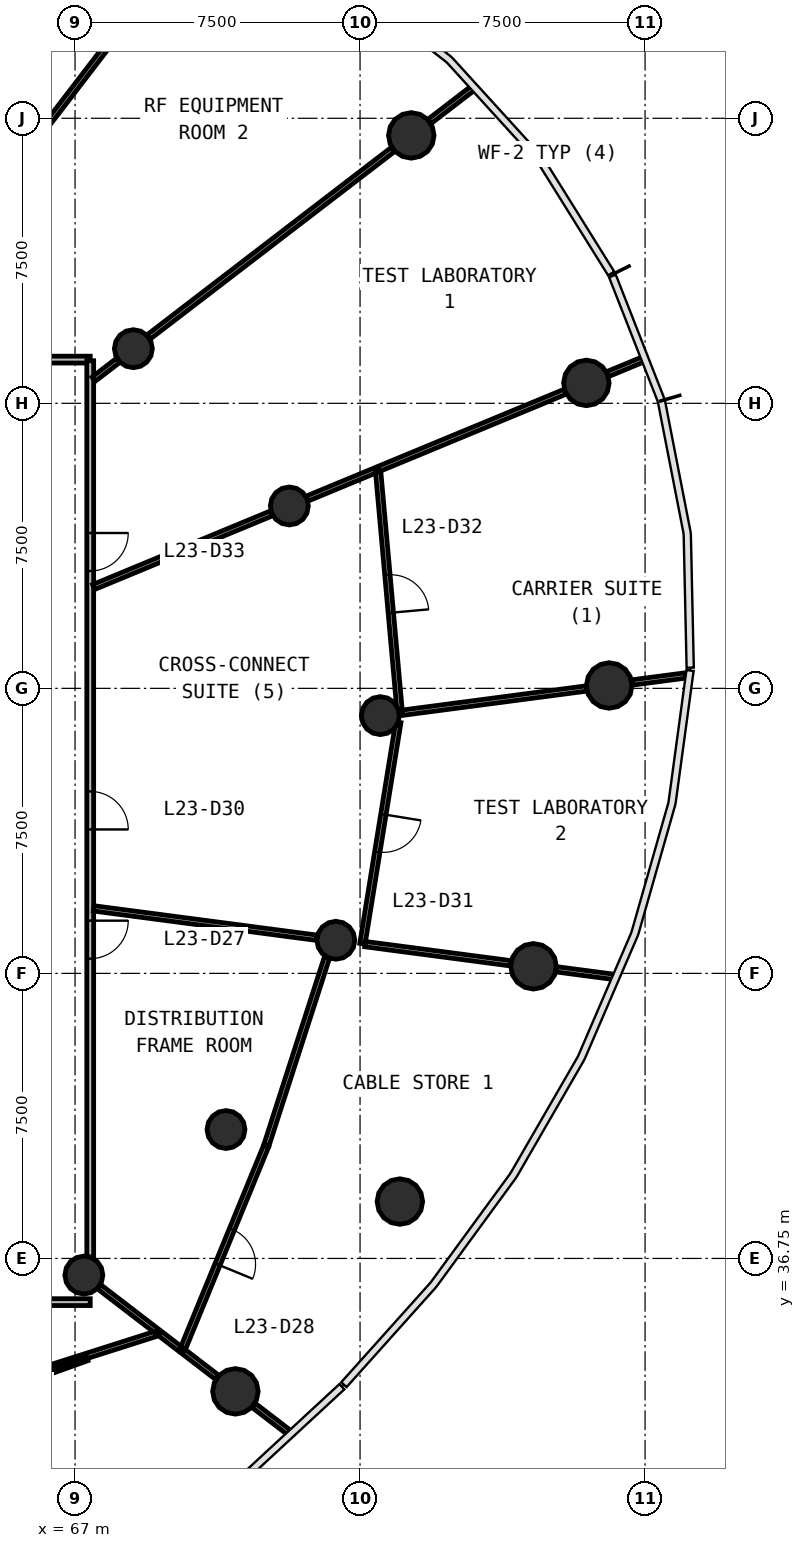
"""IFC4 building model, lengths in metres.
Left out: names, types, materials, properties, quantities, classifications, styles, units other than length and angle.
Written with IfcOpenShell. Run it as: python <this file> out.ifc"""

import sys

from ifc_helpers import new_model, si_unit, direction, frame, frame_2d, origin, origin_2d, place, context, subcontext, project, spatial, rectangle, circle, extrude, source, transform, mapped, element, fill, save


model = new_model("IFC4")
c1 = context("Model", 3, precision=1e-05, world=origin(), true_north=direction((0.0, 1.0)))
c2 = subcontext(c1, "Body", "Model", "MODEL_VIEW")
j1 = project(units=[si_unit("LENGTHUNIT", "METRE"), si_unit("PLANEANGLEUNIT", "RADIAN")], contexts=[c1])
p1 = place(None, origin())
s1 = spatial("IfcSite", under=j1, at=p1, CompositionType="ELEMENT")
p2 = place(p1, origin())
s2 = spatial("IfcBuilding", under=s1, at=p2, CompositionType="ELEMENT")
p3 = place(p2, frame((0.0, 0.0, 100.3)))
s3 = spatial("IfcBuildingStorey", under=s2, at=p3, CompositionType="ELEMENT", Elevation=100.3)
m1 = source(origin(), c2, "Body", "SweptSolid", [
    extrude(circle(Radius=0.6, at=origin_2d()), origin(), (0.0, 0.0, 1.0), 4.1),
])
for number, where, z_axis, x_axis in (
    (1, (81.056, 51.825, 0.0), (0.0, 0.0, 1.0), (1.0, 0.0, 0.0)),
    (2, (80.456, 59.787, 0.0), (0.0, 0.0, 1.0), (1.0, 0.0, 0.0)),
    (3, (75.848, 66.299, 0.0), (0.0, 0.0, 1.0), (1.0, 0.0, 0.0)),
    (4, (71.22, 33.252, 0.0), (0.0, 0.0, 1.0), (1.0, 0.0, 0.0)),
    (5, (75.548, 38.246, 0.0), (0.0, 0.0, 1.0), (1.0, 0.0, 0.0)),
    (6, (79.064, 44.437, 0.0), (0.0, 0.0, 1.0), (1.0, 0.0, 0.0)),
):
    element("IfcColumn", number, at=place(p3, frame(where, z_axis=z_axis, x_axis=x_axis)), inside=s3, PredefinedType="COLUMN", context=c2, shape_type="MappedRepresentation", body=[
        mapped(m1, transform((0.0, 0.0, 0.0), scale=1.0)),
    ])
m2 = source(origin(), c2, "Body", "SweptSolid", [
    extrude(circle(Radius=0.5, at=origin_2d()), origin(), (0.0, 0.0, 1.0), 4.1),
])
for number, where, z_axis, x_axis in (
    (7, (75.034, 51.032, 0.0), (0.0, 0.0, 1.0), (1.0, 0.0, 0.0)),
    (8, (72.639, 56.549, 0.0), (0.0, 0.0, 1.0), (1.0, 0.0, 0.0)),
    (9, (68.535, 60.688, 0.0), (0.0, 0.0, 1.0), (1.0, 0.0, 0.0)),
    (10, (67.232, 36.312, 0.0), (0.0, 0.0, 1.0), (1.0, 0.0, 0.0)),
    (11, (70.972, 40.141, 0.0), (0.0, 0.0, 1.0), (1.0, 0.0, 0.0)),
    (12, (73.863, 45.122, 0.0), (0.0, 0.0, 1.0), (1.0, 0.0, 0.0)),
):
    element("IfcColumn", number, at=place(p3, frame(where, z_axis=z_axis, x_axis=x_axis)), inside=s3, PredefinedType="COLUMN", context=c2, shape_type="MappedRepresentation", body=[
        mapped(m2, transform((0.0, 0.0, 0.0), scale=1.0)),
    ])
p4 = place(p3, frame((67.4, 35.6, 0.0), z_axis=(0.0, 0.0, 1.0), x_axis=(-1.0, 0.0, 0.0)))
e13 = element("IfcWall", 13, at=p4, inside=s3, PredefinedType="PARTITIONING", context=c2, shape_type="SweptSolid", body=[
    extrude(rectangle(XDim=30.8, YDim=0.18, at=frame_2d((15.4, 0.0))), origin(), (0.0, 0.0, 1.0), 2.9),
])
p5 = place(p4, frame((9.05, 0.0, 0.0)))
e14 = element("IfcOpeningElement", 14, at=p5, cuts=e13, PredefinedType="OPENING", context=c2, shape_type="SweptSolid", body=[
    extrude(rectangle(XDim=0.9, YDim=2.1, at=frame_2d((0.45, 1.05))), frame((0.0, 0.1, 0.0), z_axis=(0.0, -1.0, 0.0), x_axis=(1.0, 0.0, 0.0)), (0.0, 0.0, 1.0), 0.2),
])
p6 = place(p4, frame((6.05, 0.0, 0.0)))
e15 = element("IfcOpeningElement", 15, at=p6, cuts=e13, PredefinedType="OPENING", context=c2, shape_type="SweptSolid", body=[
    extrude(rectangle(XDim=0.9, YDim=2.1, at=frame_2d((0.45, 1.05))), frame((0.0, 0.1, 0.0), z_axis=(0.0, -1.0, 0.0), x_axis=(1.0, 0.0, 0.0)), (0.0, 0.0, 1.0), 0.2),
])
p7 = place(p4, frame((2.45, 0.0, 0.0)))
e16 = element("IfcOpeningElement", 16, at=p7, cuts=e13, PredefinedType="OPENING", context=c2, shape_type="SweptSolid", body=[
    extrude(rectangle(XDim=0.9, YDim=2.1, at=frame_2d((0.45, 1.05))), frame((0.0, 0.1, 0.0), z_axis=(0.0, -1.0, 0.0), x_axis=(1.0, 0.0, 0.0)), (0.0, 0.0, 1.0), 0.2),
])
p8 = place(p4, frame((20.95, 0.0, 0.0)))
e17 = element("IfcOpeningElement", 17, at=p8, cuts=e13, PredefinedType="OPENING", context=c2, shape_type="SweptSolid", body=[
    extrude(rectangle(XDim=1.0, YDim=2.1, at=frame_2d((0.5, 1.05))), frame((0.0, 0.1, 0.0), z_axis=(0.0, -1.0, 0.0), x_axis=(1.0, 0.0, 0.0)), (0.0, 0.0, 1.0), 0.2),
])
p9 = place(p4, frame((14.95, 0.0, 0.0)))
e18 = element("IfcOpeningElement", 18, at=p9, cuts=e13, PredefinedType="OPENING", context=c2, shape_type="SweptSolid", body=[
    extrude(rectangle(XDim=1.0, YDim=2.1, at=frame_2d((0.5, 1.05))), frame((0.0, 0.1, 0.0), z_axis=(0.0, -1.0, 0.0), x_axis=(1.0, 0.0, 0.0)), (0.0, 0.0, 1.0), 0.2),
])
p10 = place(p4, frame((12.55, 0.0, 0.0)))
e19 = element("IfcOpeningElement", 19, at=p10, cuts=e13, PredefinedType="OPENING", context=c2, shape_type="SweptSolid", body=[
    extrude(rectangle(XDim=1.0, YDim=2.1, at=frame_2d((0.5, 1.05))), frame((0.0, 0.1, 0.0), z_axis=(0.0, -1.0, 0.0), x_axis=(1.0, 0.0, 0.0)), (0.0, 0.0, 1.0), 0.2),
])
p11 = place(p3, frame((36.6, 60.4, 0.0), z_axis=(0.0, 0.0, 1.0), x_axis=(1.0, 0.0, 0.0)))
e20 = element("IfcWall", 20, at=p11, inside=s3, PredefinedType="PARTITIONING", context=c2, shape_type="SweptSolid", body=[
    extrude(rectangle(XDim=30.8, YDim=0.18, at=frame_2d((15.4, 0.0))), origin(), (0.0, 0.0, 1.0), 2.9),
])
p12 = place(p11, frame((25.55, 0.0, 0.0)))
e21 = element("IfcOpeningElement", 21, at=p12, cuts=e20, PredefinedType="OPENING", context=c2, shape_type="SweptSolid", body=[
    extrude(rectangle(XDim=1.0, YDim=2.1, at=frame_2d((0.5, 1.05))), frame((0.0, 0.1, 0.0), z_axis=(0.0, -1.0, 0.0), x_axis=(1.0, 0.0, 0.0)), (0.0, 0.0, 1.0), 0.2),
])
p13 = place(p11, frame((20.95, 0.0, 0.0)))
e22 = element("IfcOpeningElement", 22, at=p13, cuts=e20, PredefinedType="OPENING", context=c2, shape_type="SweptSolid", body=[
    extrude(rectangle(XDim=1.0, YDim=2.1, at=frame_2d((0.5, 1.05))), frame((0.0, 0.1, 0.0), z_axis=(0.0, -1.0, 0.0), x_axis=(1.0, 0.0, 0.0)), (0.0, 0.0, 1.0), 0.2),
])
p14 = place(p11, frame((14.95, 0.0, 0.0)))
e23 = element("IfcOpeningElement", 23, at=p14, cuts=e20, PredefinedType="OPENING", context=c2, shape_type="SweptSolid", body=[
    extrude(rectangle(XDim=1.0, YDim=2.1, at=frame_2d((0.5, 1.05))), frame((0.0, 0.1, 0.0), z_axis=(0.0, -1.0, 0.0), x_axis=(1.0, 0.0, 0.0)), (0.0, 0.0, 1.0), 0.2),
])
p15 = place(p11, frame((8.95, 0.0, 0.0)))
e24 = element("IfcOpeningElement", 24, at=p15, cuts=e20, PredefinedType="OPENING", context=c2, shape_type="SweptSolid", body=[
    extrude(rectangle(XDim=1.0, YDim=2.1, at=frame_2d((0.5, 1.05))), frame((0.0, 0.1, 0.0), z_axis=(0.0, -1.0, 0.0), x_axis=(1.0, 0.0, 0.0)), (0.0, 0.0, 1.0), 0.2),
])
p16 = place(p3, frame((67.4, 60.37, 0.0), z_axis=(0.0, 0.0, 1.0), x_axis=(0.0, -1.0, 0.0)))
e25 = element("IfcWall", 25, at=p16, inside=s3, PredefinedType="PARTITIONING", context=c2, shape_type="SweptSolid", body=[
    extrude(rectangle(XDim=23.583, YDim=0.18, at=frame_2d((11.791, 0.0))), origin(), (0.0, 0.0, 1.0), 2.9),
])
p17 = place(p16, frame((14.732, 0.0, 0.0)))
e26 = element("IfcOpeningElement", 26, at=p17, cuts=e25, PredefinedType="OPENING", context=c2, shape_type="SweptSolid", body=[
    extrude(rectangle(XDim=1.0, YDim=2.1, at=frame_2d((0.5, 1.05))), frame((0.0, 0.1, 0.0), z_axis=(0.0, -1.0, 0.0), x_axis=(1.0, 0.0, 0.0)), (0.0, 0.0, 1.0), 0.2),
])
p18 = place(p16, frame((11.333, 0.0, 0.0)))
e27 = element("IfcOpeningElement", 27, at=p18, cuts=e25, PredefinedType="OPENING", context=c2, shape_type="SweptSolid", body=[
    extrude(rectangle(XDim=1.0, YDim=2.1, at=frame_2d((0.5, 1.05))), frame((0.0, 0.1, 0.0), z_axis=(0.0, -1.0, 0.0), x_axis=(1.0, 0.0, 0.0)), (0.0, 0.0, 1.0), 0.2),
])
p19 = place(p16, frame((4.532, 0.0, 0.0)))
e28 = element("IfcOpeningElement", 28, at=p19, cuts=e25, PredefinedType="OPENING", context=c2, shape_type="SweptSolid", body=[
    extrude(rectangle(XDim=1.0, YDim=2.1, at=frame_2d((0.5, 1.05))), frame((0.0, 0.1, 0.0), z_axis=(0.0, -1.0, 0.0), x_axis=(1.0, 0.0, 0.0)), (0.0, 0.0, 1.0), 0.2),
])
p20 = place(p3, frame((68.935, 60.995, 0.0), z_axis=(0.0, 0.0, 1.0), x_axis=(0.793358692504, 0.608754453805, 0.0)))
e29 = element("IfcWall", 29, at=p20, inside=s3, PredefinedType="PARTITIONING", context=c2, shape_type="SweptSolid", body=[
    extrude(rectangle(XDim=8.11, YDim=0.14, at=frame_2d((4.055, 0.0))), origin(), (0.0, 0.0, 1.0), 2.9),
])
p21 = place(p3, frame((64.142, 63.824, 0.0), z_axis=(0.0, 0.0, 1.0), x_axis=(0.608755907151, 0.793357577331, 0.0)))
e30 = element("IfcWall", 30, at=p21, inside=s3, PredefinedType="PARTITIONING", context=c2, shape_type="SweptSolid", body=[
    extrude(rectangle(XDim=7.615, YDim=0.14, at=frame_2d((3.808, 0.0))), origin(), (0.0, 0.0, 1.0), 2.9),
])
p22 = place(p3, frame((74.97, 57.515, 0.0), z_axis=(0.0, 0.0, 1.0), x_axis=(0.089462467016, -0.995990194227, 0.0)))
e31 = element("IfcWall", 31, at=p22, inside=s3, PredefinedType="PARTITIONING", context=c2, shape_type="SweptSolid", body=[
    extrude(rectangle(XDim=6.44, YDim=0.14, at=frame_2d((3.22, 0.0))), origin(), (0.0, 0.0, 1.0), 2.9),
])
p23 = place(p22, frame((2.791, 0.0, 0.0)))
e32 = element("IfcOpeningElement", 32, at=p23, cuts=e31, PredefinedType="OPENING", context=c2, shape_type="SweptSolid", body=[
    extrude(rectangle(XDim=1.0, YDim=2.1, at=frame_2d((0.5, 1.05))), frame((0.0, 0.08, 0.0), z_axis=(0.0, -1.0, 0.0), x_axis=(1.0, 0.0, 0.0)), (0.0, 0.0, 1.0), 0.16),
])
p24 = place(p3, frame((67.49, 45.961, 0.0), z_axis=(0.0, 0.0, 1.0), x_axis=(0.991445034615, -0.130524876315, 0.0)))
e33 = element("IfcWall", 33, at=p24, inside=s3, PredefinedType="PARTITIONING", context=c2, shape_type="SweptSolid", body=[
    extrude(rectangle(XDim=5.924, YDim=0.14, at=frame_2d((2.962, 0.0))), origin(), (0.0, 0.0, 1.0), 2.9),
])
p25 = place(p3, frame((63.525, 32.98, 0.0), z_axis=(0.0, 0.0, 1.0), x_axis=(0.952796236259, 0.303610494172, 0.0)))
e34 = element("IfcWall", 34, at=p25, inside=s3, PredefinedType="PARTITIONING", context=c2, shape_type="SweptSolid", body=[
    extrude(rectangle(XDim=5.969, YDim=0.14, at=frame_2d((2.984, 0.0))), origin(), (0.0, 0.0, 1.0), 2.9),
])
p26 = place(p3, frame((75.507, 50.858, 0.0), z_axis=(0.0, 0.0, 1.0), x_axis=(-0.160052648202, -0.987108479248, 0.0)))
e35 = element("IfcWall", 35, at=p26, inside=s3, PredefinedType="PARTITIONING", context=c2, shape_type="SweptSolid", body=[
    extrude(rectangle(XDim=5.905, YDim=0.14, at=frame_2d((2.952, 0.0))), origin(), (0.0, 0.0, 1.0), 2.9),
])
p27 = place(p26, frame((2.455, 0.0, 0.0)))
e36 = element("IfcOpeningElement", 36, at=p27, cuts=e35, PredefinedType="OPENING", context=c2, shape_type="SweptSolid", body=[
    extrude(rectangle(XDim=1.0, YDim=2.1, at=frame_2d((0.5, 1.05))), frame((0.0, 0.08, 0.0), z_axis=(0.0, -1.0, 0.0), x_axis=(1.0, 0.0, 0.0)), (0.0, 0.0, 1.0), 0.16),
])
p28 = place(p3, frame((72.028, 39.704, 0.0), z_axis=(0.0, 0.0, 1.0), x_axis=(-0.380042060719, -0.92496920602, 0.0)))
e37 = element("IfcWall", 37, at=p28, inside=s3, PredefinedType="PARTITIONING", context=c2, shape_type="SweptSolid", body=[
    extrude(rectangle(XDim=5.813, YDim=0.14, at=frame_2d((2.907, 0.0))), origin(), (0.0, 0.0, 1.0), 2.9),
])
p29 = place(p28, frame((2.363, 0.0, 0.0)))
e38 = element("IfcOpeningElement", 38, at=p29, cuts=e37, PredefinedType="OPENING", context=c2, shape_type="SweptSolid", body=[
    extrude(rectangle(XDim=1.0, YDim=2.1, at=frame_2d((0.5, 1.05))), frame((0.0, 0.08, 0.0), z_axis=(0.0, -1.0, 0.0), x_axis=(1.0, 0.0, 0.0)), (0.0, 0.0, 1.0), 0.16),
])
p30 = place(p3, frame((74.998, 57.526, 0.0), z_axis=(0.0, 0.0, 1.0), x_axis=(0.923875965801, 0.382692043051, 0.0)))
e39 = element("IfcWall", 39, at=p30, inside=s3, PredefinedType="PARTITIONING", context=c2, shape_type="SweptSolid", body=[
    extrude(rectangle(XDim=5.302, YDim=0.14, at=frame_2d((2.651, 0.0))), origin(), (0.0, 0.0, 1.0), 2.9),
])
p31 = place(p3, frame((72.037, 39.733, 0.0), z_axis=(0.0, 0.0, 1.0), x_axis=(0.307028885335, 0.951700196265, 0.0)))
e40 = element("IfcWall", 40, at=p31, inside=s3, PredefinedType="PARTITIONING", context=c2, shape_type="SweptSolid", body=[
    extrude(rectangle(XDim=5.192, YDim=0.14, at=frame_2d((2.596, 0.0))), origin(), (0.0, 0.0, 1.0), 2.9),
])
p32 = place(p3, frame((67.49, 54.416, 0.0), z_axis=(0.0, 0.0, 1.0), x_axis=(0.923890025086, 0.382658100067, 0.0)))
e41 = element("IfcWall", 41, at=p32, inside=s3, PredefinedType="PARTITIONING", context=c2, shape_type="SweptSolid", body=[
    extrude(rectangle(XDim=5.068, YDim=0.14, at=frame_2d((2.534, 0.0))), origin(), (0.0, 0.0, 1.0), 2.9),
])
p33 = place(p3, frame((75.616, 51.109, 0.0), z_axis=(0.0, 0.0, 1.0), x_axis=(0.991441867731, 0.130548929177, 0.0)))
e42 = element("IfcWall", 42, at=p33, inside=s3, PredefinedType="PARTITIONING", context=c2, shape_type="SweptSolid", body=[
    extrude(rectangle(XDim=4.883, YDim=0.14, at=frame_2d((2.441, 0.0))), origin(), (0.0, 0.0, 1.0), 2.9),
])
p34 = place(p3, frame((74.632, 45.021, 0.0), z_axis=(0.0, 0.0, 1.0), x_axis=(0.991447632366, -0.130505142718, 0.0)))
e43 = element("IfcWall", 43, at=p34, inside=s3, PredefinedType="PARTITIONING", context=c2, shape_type="SweptSolid", body=[
    extrude(rectangle(XDim=3.867, YDim=0.14, at=frame_2d((1.933, 0.0))), origin(), (0.0, 0.0, 1.0), 2.9),
])
p35 = place(p3, frame((73.106, 56.742, 0.0), z_axis=(0.0, 0.0, 1.0), x_axis=(0.923843914347, 0.382769410904, 0.0)))
e44 = element("IfcWall", 44, at=p35, inside=s3, PredefinedType="PARTITIONING", context=c2, shape_type="SweptSolid", body=[
    extrude(rectangle(XDim=1.945, YDim=0.14, at=frame_2d((0.972, 0.0))), origin(), (0.0, 0.0, 1.0), 2.9),
])
p36 = place(p3, frame((67.633, 36.005, 0.0), z_axis=(0.0, 0.0, 1.0), x_axis=(0.79330932609, -0.608818785139, 0.0)))
e45 = element("IfcWall", 45, at=p36, inside=s3, PredefinedType="PARTITIONING", context=c2, shape_type="SweptSolid", body=[
    extrude(rectangle(XDim=1.906, YDim=0.14, at=frame_2d((0.953, 0.0))), origin(), (0.0, 0.0, 1.0), 2.9),
])
p37 = place(p3, frame((79.664, 44.358, 0.0), z_axis=(0.0, 0.0, 1.0), x_axis=(0.991447745975, -0.130504279629, 0.0)))
e46 = element("IfcWall", 46, at=p37, inside=s3, PredefinedType="PARTITIONING", context=c2, shape_type="SweptSolid", body=[
    extrude(rectangle(XDim=1.523, YDim=0.14, at=frame_2d((0.761, 0.0))), origin(), (0.0, 0.0, 1.0), 2.9),
])
p38 = place(p3, frame((76.328, 66.667, 0.0), z_axis=(0.0, 0.0, 1.0), x_axis=(0.793384012646, 0.608721453932, 0.0)))
e47 = element("IfcWall", 47, at=p38, inside=s3, PredefinedType="PARTITIONING", context=c2, shape_type="SweptSolid", body=[
    extrude(rectangle(XDim=1.432, YDim=0.14, at=frame_2d((0.716, 0.0))), origin(), (0.0, 0.0, 1.0), 2.9),
])
p39 = place(p3, frame((81.656, 51.904, 0.0), z_axis=(0.0, 0.0, 1.0), x_axis=(0.991440859851, 0.130556583206, 0.0)))
e48 = element("IfcWall", 48, at=p39, inside=s3, PredefinedType="PARTITIONING", context=c2, shape_type="SweptSolid", body=[
    extrude(rectangle(XDim=1.423, YDim=0.14, at=frame_2d((0.711, 0.0))), origin(), (0.0, 0.0, 1.0), 2.9),
])
p40 = place(p3, frame((71.699, 32.884, 0.0), z_axis=(0.0, 0.0, 1.0), x_axis=(0.793332880396, -0.608788091935, 0.0)))
e49 = element("IfcWall", 49, at=p40, inside=s3, PredefinedType="PARTITIONING", context=c2, shape_type="SweptSolid", body=[
    extrude(rectangle(XDim=1.164, YDim=0.14, at=frame_2d((0.582, 0.0))), origin(), (0.0, 0.0, 1.0), 2.9),
])
p41 = place(p3, frame((69.843, 34.309, 0.0), z_axis=(0.0, 0.0, 1.0), x_axis=(0.793321446023, -0.608802992174, 0.0)))
e50 = element("IfcWall", 50, at=p41, inside=s3, PredefinedType="PARTITIONING", context=c2, shape_type="SweptSolid", body=[
    extrude(rectangle(XDim=1.131, YDim=0.14, at=frame_2d((0.566, 0.0))), origin(), (0.0, 0.0, 1.0), 2.9),
])
p42 = place(p3, frame((81.014, 60.018, 0.0), z_axis=(0.0, 0.0, 1.0), x_axis=(0.923909071339, 0.38261211154, 0.0)))
e51 = element("IfcWall", 51, at=p42, inside=s3, PredefinedType="PARTITIONING", context=c2, shape_type="SweptSolid", body=[
    extrude(rectangle(XDim=1.021, YDim=0.14, at=frame_2d((0.511, 0.0))), origin(), (0.0, 0.0, 1.0), 2.9),
])
p43 = place(p3, frame((67.49, 59.886, 0.0), z_axis=(0.0, 0.0, 1.0), x_axis=(0.793316076519, 0.608809989025, 0.0)))
e52 = element("IfcWall", 52, at=p43, inside=s3, PredefinedType="PARTITIONING", context=c2, shape_type="SweptSolid", body=[
    extrude(rectangle(XDim=0.812, YDim=0.14, at=frame_2d((0.406, 0.0))), origin(), (0.0, 0.0, 1.0), 2.9),
])
p44 = place(p3, frame((69.236, 34.774, 0.0), z_axis=(0.0, 0.0, 1.0), x_axis=(0.793363129336, -0.608748671465, 0.0)))
e53 = element("IfcWall", 53, at=p44, inside=s3, PredefinedType="PARTITIONING", context=c2, shape_type="SweptSolid", body=[
    extrude(rectangle(XDim=0.663, YDim=0.14, at=frame_2d((0.331, 0.0))), origin(), (0.0, 0.0, 1.0), 2.9),
])
p45 = place(p3, frame((65.363, 33.417, 0.0), z_axis=(0.0, 0.0, 1.0), x_axis=(0.941622213284, 0.336671364166, 0.0)))
e54 = element("IfcWall", 54, at=p45, inside=s3, PredefinedType="PARTITIONING", context=c2, shape_type="SweptSolid", body=[
    extrude(rectangle(XDim=2.078, YDim=0.12, at=frame_2d((1.039, 0.0))), origin(), (0.0, 0.0, 1.0), 2.9),
])
m3 = source(origin(), c2, "Body", "SweptSolid", [
    extrude(rectangle(XDim=1.0, YDim=2.1, at=frame_2d((0.5, 1.05))), frame((0.0, 0.025, 0.0), z_axis=(0.0, -1.0, 0.0), x_axis=(1.0, 0.0, 0.0)), (0.0, 0.0, 1.0), 0.05),
])
p46 = place(p17, origin())
e55 = element("IfcDoor", 55, at=p46, inside=s3, OperationType="SINGLE_SWING_LEFT", PredefinedType="DOOR", context=c2, shape_type="MappedRepresentation", body=[
    mapped(m3, transform((0.0, 0.0, 0.0), scale=1.0)),
])
fill(e26, e55)
p47 = place(p29, origin())
e56 = element("IfcDoor", 56, at=p47, inside=s3, OperationType="SINGLE_SWING_RIGHT", PredefinedType="DOOR", context=c2, shape_type="MappedRepresentation", body=[
    mapped(m3, transform((0.0, 0.0, 0.0), scale=1.0)),
])
fill(e38, e56)
p48 = place(p18, origin())
e57 = element("IfcDoor", 57, at=p48, inside=s3, OperationType="SINGLE_SWING_RIGHT", PredefinedType="DOOR", context=c2, shape_type="MappedRepresentation", body=[
    mapped(m3, transform((0.0, 0.0, 0.0), scale=1.0)),
])
fill(e27, e57)
p49 = place(p27, origin())
e58 = element("IfcDoor", 58, at=p49, inside=s3, OperationType="SINGLE_SWING_LEFT", PredefinedType="DOOR", context=c2, shape_type="MappedRepresentation", body=[
    mapped(m3, transform((0.0, 0.0, 0.0), scale=1.0)),
])
fill(e36, e58)
p50 = place(p23, origin())
e59 = element("IfcDoor", 59, at=p50, inside=s3, OperationType="SINGLE_SWING_RIGHT", PredefinedType="DOOR", context=c2, shape_type="MappedRepresentation", body=[
    mapped(m3, transform((0.0, 0.0, 0.0), scale=1.0)),
])
fill(e32, e59)
p51 = place(p19, origin())
e60 = element("IfcDoor", 60, at=p51, inside=s3, OperationType="SINGLE_SWING_LEFT", PredefinedType="DOOR", context=c2, shape_type="MappedRepresentation", body=[
    mapped(m3, transform((0.0, 0.0, 0.0), scale=1.0)),
])
fill(e28, e60)
save(model, sys.argv[1])
